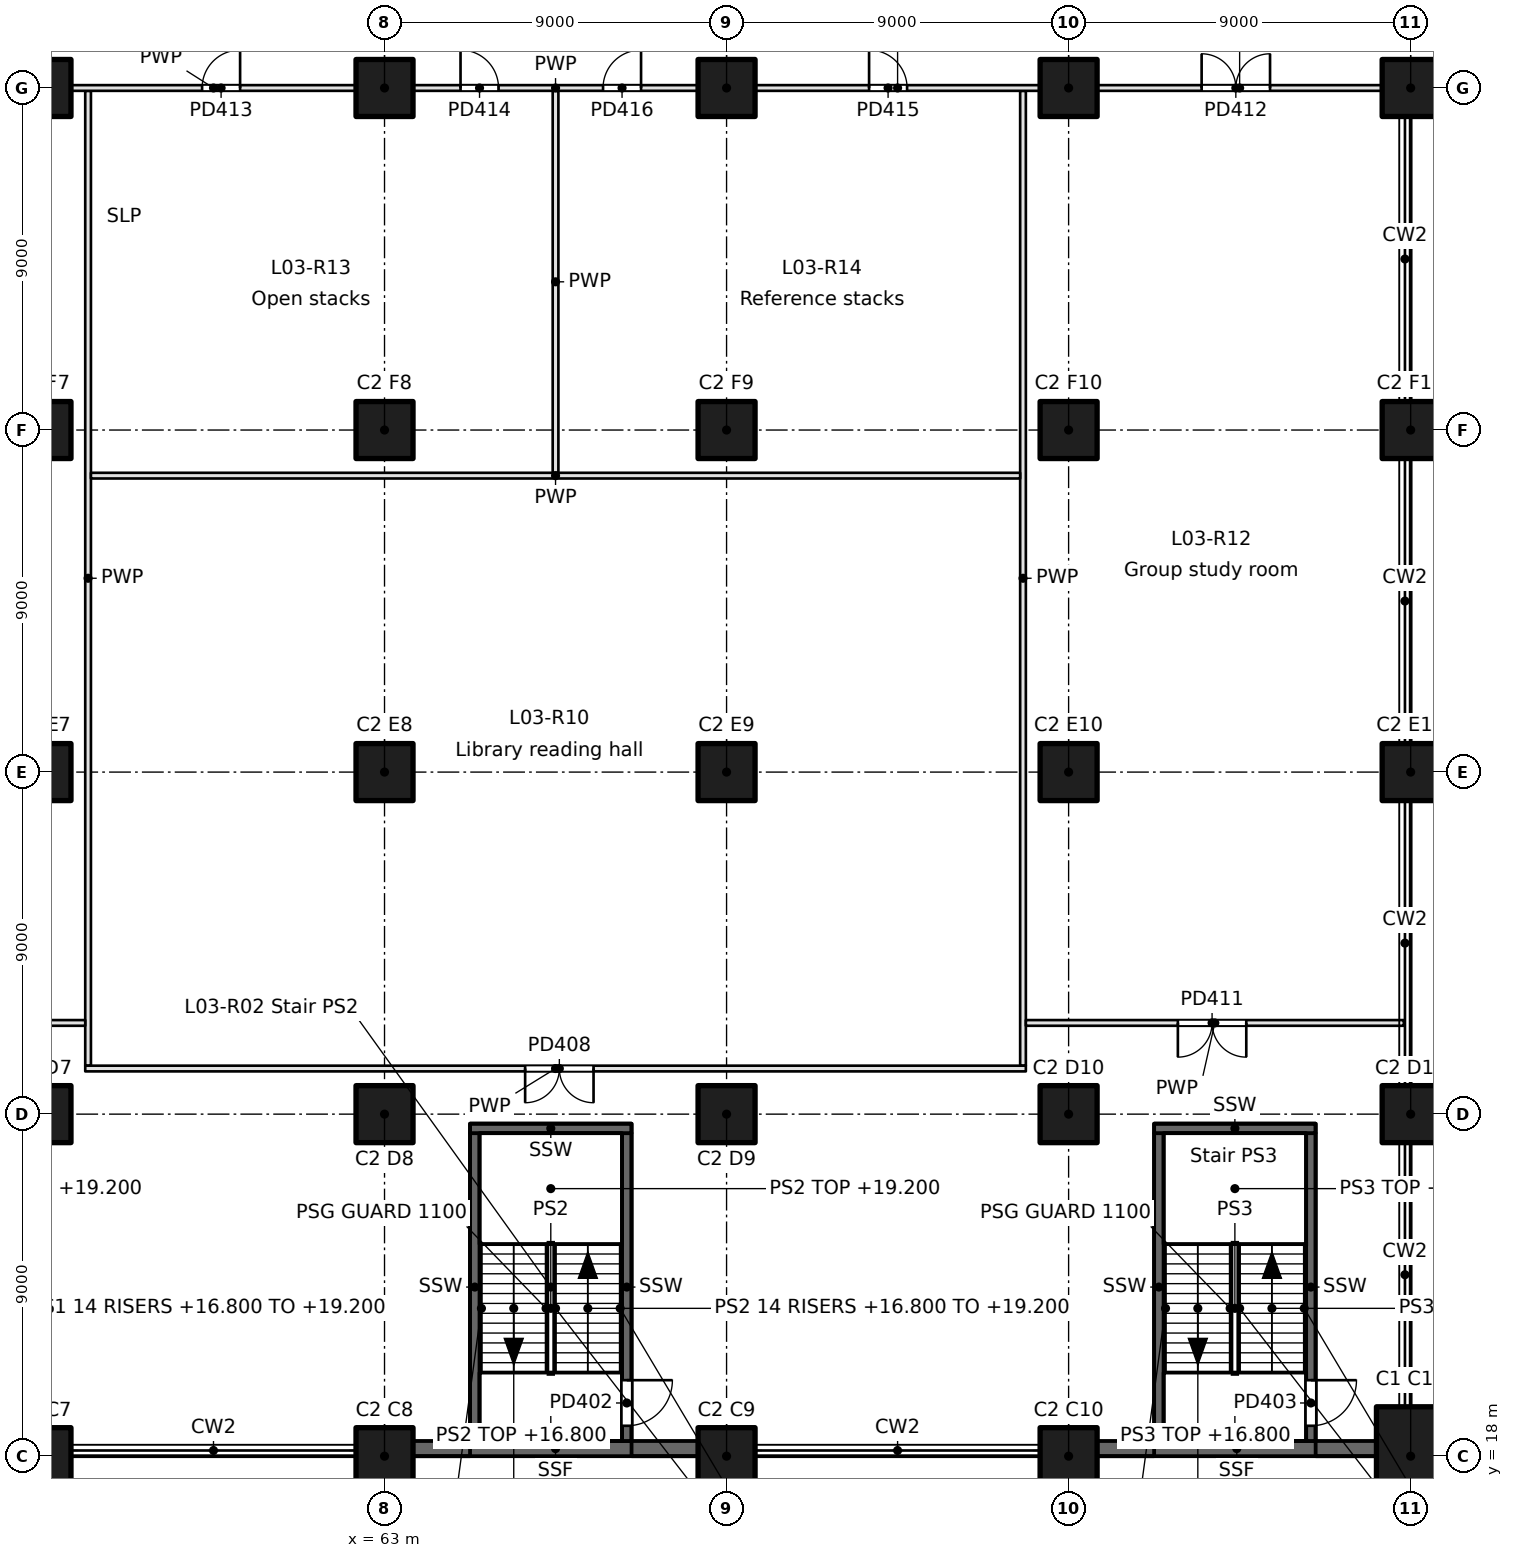
"""IFC4 building model, lengths in metres.
Left out: names, types, materials, properties, quantities, classifications, styles, units other than length and angle.
Written with IfcOpenShell. Run it as: python <this file> out.ifc"""

import sys

from ifc_helpers import new_model, si_unit, direction, frame, frame_2d, origin, origin_2d, place, context, subcontext, project, spatial, rectangle, extrude, element, fill, save


model = new_model("IFC4")
c1 = context("Model", 3, precision=1e-05, world=origin(), true_north=direction((0.0, 1.0)))
c2 = subcontext(c1, "Body", "Model", "MODEL_VIEW")
j1 = project(units=[si_unit("LENGTHUNIT", "METRE"), si_unit("PLANEANGLEUNIT", "RADIAN")], contexts=[c1])
p1 = place(None, origin())
s1 = spatial("IfcSite", under=j1, at=p1, CompositionType="ELEMENT")
p2 = place(p1, origin())
s2 = spatial("IfcBuilding", under=s1, at=p2, CompositionType="ELEMENT")
p3 = place(p2, frame((0.0, 0.0, 16.8)))
s3 = spatial("IfcBuildingStorey", under=s2, at=p3, CompositionType="ELEMENT", Elevation=16.8)
for number, where, z_axis, x_axis in (
    (1, (54.0, 54.0, 0.0), (0.0, 0.0, 1.0), (1.0, 0.0, 0.0)),
    (2, (63.0, 54.0, 0.0), (0.0, 0.0, 1.0), (1.0, 0.0, 0.0)),
    (3, (72.0, 54.0, 0.0), (0.0, 0.0, 1.0), (1.0, 0.0, 0.0)),
    (4, (81.0, 54.0, 0.0), (0.0, 0.0, 1.0), (1.0, 0.0, 0.0)),
    (5, (90.0, 54.0, 0.0), (0.0, 0.0, 1.0), (1.0, 0.0, 0.0)),
    (6, (54.0, 18.0, 0.0), (0.0, 0.0, 1.0), (1.0, 0.0, 0.0)),
    (7, (63.0, 18.0, 0.0), (0.0, 0.0, 1.0), (1.0, 0.0, 0.0)),
    (8, (72.0, 18.0, 0.0), (0.0, 0.0, 1.0), (1.0, 0.0, 0.0)),
    (9, (81.0, 18.0, 0.0), (0.0, 0.0, 1.0), (1.0, 0.0, 0.0)),
):
    element("IfcColumn", number, at=place(p3, frame(where, z_axis=z_axis, x_axis=x_axis)), inside=s3, PredefinedType="COLUMN", context=c2, shape_type="SweptSolid", body=[
        extrude(rectangle(XDim=1.5, YDim=1.5, at=origin_2d()), origin(), (0.0, 0.0, 1.0), 4.8),
    ])
p4 = place(p3, frame((90.0, 18.0, 0.0), z_axis=(0.0, 0.0, 1.0), x_axis=(0.0, 1.0, 0.0)))
e10 = element("IfcColumn", 10, at=p4, inside=s3, PredefinedType="COLUMN", context=c2, shape_type="SweptSolid", body=[
    extrude(rectangle(XDim=2.6, YDim=1.8, at=origin_2d()), origin(), (0.0, 0.0, 1.0), 4.8),
])
for number, where, z_axis, x_axis in (
    (11, (90.0, 27.0, 0.0), (0.0, 0.0, 1.0), (1.0, 0.0, 0.0)),
    (12, (90.0, 36.0, 0.0), (0.0, 0.0, 1.0), (1.0, 0.0, 0.0)),
    (13, (90.0, 45.0, 0.0), (0.0, 0.0, 1.0), (1.0, 0.0, 0.0)),
    (14, (54.0, 27.0, 0.0), (0.0, 0.0, 1.0), (1.0, 0.0, 0.0)),
):
    element("IfcColumn", number, at=place(p3, frame(where, z_axis=z_axis, x_axis=x_axis)), inside=s3, PredefinedType="COLUMN", context=c2, shape_type="SweptSolid", body=[
        extrude(rectangle(XDim=1.5, YDim=1.5, at=origin_2d()), origin(), (0.0, 0.0, 1.0), 4.8),
    ])
for number, where, z_axis, x_axis in (
    (15, (54.0, 36.0, -0.35), (0.0, 0.0, 1.0), (1.0, 0.0, 0.0)),
    (16, (54.0, 45.0, -0.35), (0.0, 0.0, 1.0), (1.0, 0.0, 0.0)),
):
    element("IfcColumn", number, at=place(p3, frame(where, z_axis=z_axis, x_axis=x_axis)), inside=s3, PredefinedType="COLUMN", context=c2, shape_type="SweptSolid", body=[
        extrude(rectangle(XDim=1.5, YDim=1.5, at=origin_2d()), origin(), (0.0, 0.0, 1.0), 5.15),
    ])
p5 = place(p3, frame((63.0, 27.0, 0.0), z_axis=(0.0, 0.0, 1.0), x_axis=(1.0, 0.0, 0.0)))
e17 = element("IfcColumn", 17, at=p5, inside=s3, PredefinedType="COLUMN", context=c2, shape_type="SweptSolid", body=[
    extrude(rectangle(XDim=1.5, YDim=1.5, at=origin_2d()), origin(), (0.0, 0.0, 1.0), 4.8),
])
for number, where, z_axis, x_axis in (
    (18, (63.0, 36.0, -0.35), (0.0, 0.0, 1.0), (1.0, 0.0, 0.0)),
    (19, (63.0, 45.0, -0.35), (0.0, 0.0, 1.0), (1.0, 0.0, 0.0)),
):
    element("IfcColumn", number, at=place(p3, frame(where, z_axis=z_axis, x_axis=x_axis)), inside=s3, PredefinedType="COLUMN", context=c2, shape_type="SweptSolid", body=[
        extrude(rectangle(XDim=1.5, YDim=1.5, at=origin_2d()), origin(), (0.0, 0.0, 1.0), 5.15),
    ])
p6 = place(p3, frame((72.0, 27.0, 0.0), z_axis=(0.0, 0.0, 1.0), x_axis=(1.0, 0.0, 0.0)))
e20 = element("IfcColumn", 20, at=p6, inside=s3, PredefinedType="COLUMN", context=c2, shape_type="SweptSolid", body=[
    extrude(rectangle(XDim=1.5, YDim=1.5, at=origin_2d()), origin(), (0.0, 0.0, 1.0), 4.8),
])
for number, where, z_axis, x_axis in (
    (21, (72.0, 36.0, -0.35), (0.0, 0.0, 1.0), (1.0, 0.0, 0.0)),
    (22, (72.0, 45.0, -0.35), (0.0, 0.0, 1.0), (1.0, 0.0, 0.0)),
):
    element("IfcColumn", number, at=place(p3, frame(where, z_axis=z_axis, x_axis=x_axis)), inside=s3, PredefinedType="COLUMN", context=c2, shape_type="SweptSolid", body=[
        extrude(rectangle(XDim=1.5, YDim=1.5, at=origin_2d()), origin(), (0.0, 0.0, 1.0), 5.15),
    ])
p7 = place(p3, frame((81.0, 27.0, 0.0), z_axis=(0.0, 0.0, 1.0), x_axis=(1.0, 0.0, 0.0)))
e23 = element("IfcColumn", 23, at=p7, inside=s3, PredefinedType="COLUMN", context=c2, shape_type="SweptSolid", body=[
    extrude(rectangle(XDim=1.5, YDim=1.5, at=origin_2d()), origin(), (0.0, 0.0, 1.0), 4.8),
])
for number, where, z_axis, x_axis in (
    (24, (81.0, 36.0, -0.35), (0.0, 0.0, 1.0), (1.0, 0.0, 0.0)),
    (25, (81.0, 45.0, -0.35), (0.0, 0.0, 1.0), (1.0, 0.0, 0.0)),
):
    element("IfcColumn", number, at=place(p3, frame(where, z_axis=z_axis, x_axis=x_axis)), inside=s3, PredefinedType="COLUMN", context=c2, shape_type="SweptSolid", body=[
        extrude(rectangle(XDim=1.5, YDim=1.5, at=origin_2d()), origin(), (0.0, 0.0, 1.0), 5.15),
    ])
p8 = place(p3, frame((65.375, 18.4, 0.0), z_axis=(0.0, 0.0, 1.0), x_axis=(0.0, 1.0, 0.0)))
e26 = element("IfcWall", 26, at=p8, inside=s3, PredefinedType="SOLIDWALL", context=c2, shape_type="SweptSolid", body=[
    extrude(rectangle(XDim=8.1, YDim=0.25, at=frame_2d((4.05, 0.0))), origin(), (0.0, 0.0, 1.0), 4.8),
])
p9 = place(p3, frame((69.375, 26.5, 0.0), z_axis=(0.0, 0.0, 1.0), x_axis=(0.0, -1.0, 0.0)))
e27 = element("IfcWall", 27, at=p9, inside=s3, PredefinedType="SOLIDWALL", context=c2, shape_type="SweptSolid", body=[
    extrude(rectangle(XDim=8.1, YDim=0.25, at=frame_2d((4.05, 0.0))), origin(), (0.0, 0.0, 1.0), 4.8),
])
p10 = place(p9, frame((6.5, 0.0, 0.0)))
e28 = element("IfcOpeningElement", 28, at=p10, cuts=e27, PredefinedType="OPENING", context=c2, shape_type="SweptSolid", body=[
    extrude(rectangle(XDim=1.2, YDim=2.1, at=frame_2d((0.6, 1.05))), frame((0.0, 0.125, 0.0), z_axis=(0.0, -1.0, 0.0), x_axis=(1.0, 0.0, 0.0)), (0.0, 0.0, 1.0), 0.25),
])
p11 = place(p3, frame((65.25, 26.625, 0.0), z_axis=(0.0, 0.0, 1.0), x_axis=(1.0, 0.0, 0.0)))
e29 = element("IfcWall", 29, at=p11, inside=s3, PredefinedType="SOLIDWALL", context=c2, shape_type="SweptSolid", body=[
    extrude(rectangle(XDim=4.25, YDim=0.25, at=frame_2d((2.125, 0.0))), origin(), (0.0, 0.0, 1.0), 4.8),
])
p12 = place(p3, frame((83.375, 18.4, 0.0), z_axis=(0.0, 0.0, 1.0), x_axis=(0.0, 1.0, 0.0)))
e30 = element("IfcWall", 30, at=p12, inside=s3, PredefinedType="SOLIDWALL", context=c2, shape_type="SweptSolid", body=[
    extrude(rectangle(XDim=8.1, YDim=0.25, at=frame_2d((4.05, 0.0))), origin(), (0.0, 0.0, 1.0), 4.8),
])
p13 = place(p3, frame((87.375, 26.5, 0.0), z_axis=(0.0, 0.0, 1.0), x_axis=(0.0, -1.0, 0.0)))
e31 = element("IfcWall", 31, at=p13, inside=s3, PredefinedType="SOLIDWALL", context=c2, shape_type="SweptSolid", body=[
    extrude(rectangle(XDim=8.1, YDim=0.25, at=frame_2d((4.05, 0.0))), origin(), (0.0, 0.0, 1.0), 4.8),
])
p14 = place(p13, frame((6.5, 0.0, 0.0)))
e32 = element("IfcOpeningElement", 32, at=p14, cuts=e31, PredefinedType="OPENING", context=c2, shape_type="SweptSolid", body=[
    extrude(rectangle(XDim=1.2, YDim=2.1, at=frame_2d((0.6, 1.05))), frame((0.0, 0.125, 0.0), z_axis=(0.0, -1.0, 0.0), x_axis=(1.0, 0.0, 0.0)), (0.0, 0.0, 1.0), 0.25),
])
p15 = place(p3, frame((83.25, 26.625, 0.0), z_axis=(0.0, 0.0, 1.0), x_axis=(1.0, 0.0, 0.0)))
e33 = element("IfcWall", 33, at=p15, inside=s3, PredefinedType="SOLIDWALL", context=c2, shape_type="SweptSolid", body=[
    extrude(rectangle(XDim=4.25, YDim=0.25, at=frame_2d((2.125, 0.0))), origin(), (0.0, 0.0, 1.0), 4.8),
])
p16 = place(p3, frame((71.25, 18.2, 0.0), z_axis=(0.0, 0.0, 1.0), x_axis=(-1.0, 0.0, 0.0)))
e34 = element("IfcWall", 34, at=p16, inside=s3, PredefinedType="SOLIDWALL", context=c2, shape_type="SweptSolid", body=[
    extrude(rectangle(XDim=7.5, YDim=0.4, at=frame_2d((3.75, 0.0))), origin(), (0.0, 0.0, 1.0), 4.45),
])
p17 = place(p3, frame((89.1, 18.2, 0.0), z_axis=(0.0, 0.0, 1.0), x_axis=(-1.0, 0.0, 0.0)))
e35 = element("IfcWall", 35, at=p17, inside=s3, PredefinedType="SOLIDWALL", context=c2, shape_type="SweptSolid", body=[
    extrude(rectangle(XDim=7.35, YDim=0.4, at=frame_2d((3.675, 0.0))), origin(), (0.0, 0.0, 1.0), 4.45),
])
for number, where, z_axis, x_axis in (
    (36, (55.2, 28.275, 0.0), (0.0, 0.0, 1.0), (0.0, 1.0, 0.0)),
    (37, (79.8, 28.275, 0.0), (0.0, 0.0, 1.0), (0.0, 1.0, 0.0)),
):
    element("IfcWall", number, at=place(p3, frame(where, z_axis=z_axis, x_axis=x_axis)), inside=s3, PredefinedType="PARTITIONING", context=c2, shape_type="SweptSolid", body=[
        extrude(rectangle(XDim=25.65, YDim=0.15, at=frame_2d((12.825, 0.0))), origin(), (0.0, 0.0, 1.0), 4.45),
    ])
p18 = place(p3, frame((55.275, 43.8, 0.0), z_axis=(0.0, 0.0, 1.0), x_axis=(1.0, 0.0, 0.0)))
e38 = element("IfcWall", 38, at=p18, inside=s3, PredefinedType="PARTITIONING", context=c2, shape_type="SweptSolid", body=[
    extrude(rectangle(XDim=24.45, YDim=0.15, at=frame_2d((12.225, 0.0))), origin(), (0.0, 0.0, 1.0), 4.45),
])
p19 = place(p3, frame((79.875, 28.2, 0.0), z_axis=(0.0, 0.0, 1.0), x_axis=(-1.0, 0.0, 0.0)))
e39 = element("IfcWall", 39, at=p19, inside=s3, PredefinedType="PARTITIONING", context=c2, shape_type="SweptSolid", body=[
    extrude(rectangle(XDim=24.75, YDim=0.15, at=frame_2d((12.375, 0.0))), origin(), (0.0, 0.0, 1.0), 4.45),
])
p20 = place(p19, frame((11.375, 0.0, 0.0)))
e40 = element("IfcOpeningElement", 40, at=p20, cuts=e39, PredefinedType="OPENING", context=c2, shape_type="SweptSolid", body=[
    extrude(rectangle(XDim=1.8, YDim=2.1, at=frame_2d((0.9, 1.05))), frame((0.0, 0.075, 0.0), z_axis=(0.0, -1.0, 0.0), x_axis=(1.0, 0.0, 0.0)), (0.0, 0.0, 1.0), 0.15),
])
p21 = place(p3, frame((55.125, 29.4, 0.0), z_axis=(0.0, 0.0, 1.0), x_axis=(-1.0, 0.0, 0.0)))
e41 = element("IfcWall", 41, at=p21, inside=s3, PredefinedType="PARTITIONING", context=c2, shape_type="SweptSolid", body=[
    extrude(rectangle(XDim=10.2, YDim=0.15, at=frame_2d((5.1, 0.0))), origin(), (0.0, 0.0, 1.0), 4.45),
])
p22 = place(p21, frame((4.075, 0.0, 0.0)))
e42 = element("IfcOpeningElement", 42, at=p22, cuts=e41, PredefinedType="OPENING", context=c2, shape_type="SweptSolid", body=[
    extrude(rectangle(XDim=1.8, YDim=2.1, at=frame_2d((0.9, 1.05))), frame((0.0, 0.075, 0.0), z_axis=(0.0, -1.0, 0.0), x_axis=(1.0, 0.0, 0.0)), (0.0, 0.0, 1.0), 0.15),
])
p23 = place(p3, frame((89.82, 29.4, 0.0), z_axis=(0.0, 0.0, 1.0), x_axis=(-1.0, 0.0, 0.0)))
e43 = element("IfcWall", 43, at=p23, inside=s3, PredefinedType="PARTITIONING", context=c2, shape_type="SweptSolid", body=[
    extrude(rectangle(XDim=9.945, YDim=0.15, at=frame_2d((4.973, 0.0))), origin(), (0.0, 0.0, 1.0), 4.45),
])
p24 = place(p23, frame((4.145, 0.0, 0.0)))
e44 = element("IfcOpeningElement", 44, at=p24, cuts=e43, PredefinedType="OPENING", context=c2, shape_type="SweptSolid", body=[
    extrude(rectangle(XDim=1.8, YDim=2.1, at=frame_2d((0.9, 1.05))), frame((0.0, 0.075, 0.0), z_axis=(0.0, -1.0, 0.0), x_axis=(1.0, 0.0, 0.0)), (0.0, 0.0, 1.0), 0.15),
])
p25 = place(p3, frame((54.75, 54.0, 0.0), z_axis=(0.0, 0.0, 1.0), x_axis=(1.0, 0.0, 0.0)))
e45 = element("IfcWall", 45, at=p25, inside=s3, PredefinedType="PARTITIONING", context=c2, shape_type="SweptSolid", body=[
    extrude(rectangle(XDim=7.5, YDim=0.15, at=frame_2d((3.75, 0.0))), origin(), (0.0, 0.0, 1.0), 4.45),
])
p26 = place(p25, frame((3.45, 0.0, 0.0)))
e46 = element("IfcOpeningElement", 46, at=p26, cuts=e45, PredefinedType="OPENING", context=c2, shape_type="SweptSolid", body=[
    extrude(rectangle(XDim=1.0, YDim=2.1, at=frame_2d((0.5, 1.05))), frame((0.0, 0.075, 0.0), z_axis=(0.0, -1.0, 0.0), x_axis=(1.0, 0.0, 0.0)), (0.0, 0.0, 1.0), 0.15),
])
p27 = place(p3, frame((63.75, 54.0, 0.0), z_axis=(0.0, 0.0, 1.0), x_axis=(1.0, 0.0, 0.0)))
e47 = element("IfcWall", 47, at=p27, inside=s3, PredefinedType="PARTITIONING", context=c2, shape_type="SweptSolid", body=[
    extrude(rectangle(XDim=7.5, YDim=0.15, at=frame_2d((3.75, 0.0))), origin(), (0.0, 0.0, 1.0), 4.45),
])
p28 = place(p27, frame((1.25, 0.0, 0.0)))
e48 = element("IfcOpeningElement", 48, at=p28, cuts=e47, PredefinedType="OPENING", context=c2, shape_type="SweptSolid", body=[
    extrude(rectangle(XDim=1.0, YDim=2.1, at=frame_2d((0.5, 1.05))), frame((0.0, 0.075, 0.0), z_axis=(0.0, -1.0, 0.0), x_axis=(1.0, 0.0, 0.0)), (0.0, 0.0, 1.0), 0.15),
])
p29 = place(p27, frame((5.0, 0.0, 0.0)))
e49 = element("IfcOpeningElement", 49, at=p29, cuts=e47, PredefinedType="OPENING", context=c2, shape_type="SweptSolid", body=[
    extrude(rectangle(XDim=1.0, YDim=2.1, at=frame_2d((0.5, 1.05))), frame((0.0, 0.075, 0.0), z_axis=(0.0, -1.0, 0.0), x_axis=(1.0, 0.0, 0.0)), (0.0, 0.0, 1.0), 0.15),
])
p30 = place(p3, frame((72.75, 54.0, 0.0), z_axis=(0.0, 0.0, 1.0), x_axis=(1.0, 0.0, 0.0)))
e50 = element("IfcWall", 50, at=p30, inside=s3, PredefinedType="PARTITIONING", context=c2, shape_type="SweptSolid", body=[
    extrude(rectangle(XDim=7.5, YDim=0.15, at=frame_2d((3.75, 0.0))), origin(), (0.0, 0.0, 1.0), 4.45),
])
p31 = place(p30, frame((3.0, 0.0, 0.0)))
e51 = element("IfcOpeningElement", 51, at=p31, cuts=e50, PredefinedType="OPENING", context=c2, shape_type="SweptSolid", body=[
    extrude(rectangle(XDim=1.0, YDim=2.1, at=frame_2d((0.5, 1.05))), frame((0.0, 0.075, 0.0), z_axis=(0.0, -1.0, 0.0), x_axis=(1.0, 0.0, 0.0)), (0.0, 0.0, 1.0), 0.15),
])
p32 = place(p3, frame((81.75, 54.0, 0.0), z_axis=(0.0, 0.0, 1.0), x_axis=(1.0, 0.0, 0.0)))
e52 = element("IfcWall", 52, at=p32, inside=s3, PredefinedType="PARTITIONING", context=c2, shape_type="SweptSolid", body=[
    extrude(rectangle(XDim=7.5, YDim=0.15, at=frame_2d((3.75, 0.0))), origin(), (0.0, 0.0, 1.0), 4.45),
])
p33 = place(p32, frame((2.75, 0.0, 0.0)))
e53 = element("IfcOpeningElement", 53, at=p33, cuts=e52, PredefinedType="OPENING", context=c2, shape_type="SweptSolid", body=[
    extrude(rectangle(XDim=1.8, YDim=2.1, at=frame_2d((0.9, 1.05))), frame((0.0, 0.075, 0.0), z_axis=(0.0, -1.0, 0.0), x_axis=(1.0, 0.0, 0.0)), (0.0, 0.0, 1.0), 0.15),
])
p34 = place(p3, frame((67.5, 43.875, 0.0), z_axis=(0.0, 0.0, 1.0), x_axis=(0.0, 1.0, 0.0)))
e54 = element("IfcWall", 54, at=p34, inside=s3, PredefinedType="PARTITIONING", context=c2, shape_type="SweptSolid", body=[
    extrude(rectangle(XDim=10.05, YDim=0.15, at=frame_2d((5.025, 0.0))), origin(), (0.0, 0.0, 1.0), 4.45),
])
p35 = place(p10, origin())
e55 = element("IfcDoor", 55, at=p35, inside=s3, OperationType="SINGLE_SWING_LEFT", PredefinedType="DOOR", context=c2, shape_type="SweptSolid", body=[
    extrude(rectangle(XDim=1.2, YDim=2.1, at=frame_2d((0.6, 1.05))), frame((0.0, 0.025, 0.0), z_axis=(0.0, -1.0, 0.0), x_axis=(1.0, 0.0, 0.0)), (0.0, 0.0, 1.0), 0.05),
])
fill(e28, e55)
p36 = place(p14, origin())
e56 = element("IfcDoor", 56, at=p36, inside=s3, OperationType="SINGLE_SWING_LEFT", PredefinedType="DOOR", context=c2, shape_type="SweptSolid", body=[
    extrude(rectangle(XDim=1.2, YDim=2.1, at=frame_2d((0.6, 1.05))), frame((0.0, 0.025, 0.0), z_axis=(0.0, -1.0, 0.0), x_axis=(1.0, 0.0, 0.0)), (0.0, 0.0, 1.0), 0.05),
])
fill(e32, e56)
p37 = place(p20, origin())
e57 = element("IfcDoor", 57, at=p37, inside=s3, OperationType="DOUBLE_DOOR_SINGLE_SWING", PredefinedType="DOOR", context=c2, shape_type="SweptSolid", body=[
    extrude(rectangle(XDim=1.8, YDim=2.1, at=frame_2d((0.9, 1.05))), frame((0.0, 0.025, 0.0), z_axis=(0.0, -1.0, 0.0), x_axis=(1.0, 0.0, 0.0)), (0.0, 0.0, 1.0), 0.05),
])
fill(e40, e57)
p38 = place(p24, origin())
e58 = element("IfcDoor", 58, at=p38, inside=s3, OperationType="DOUBLE_DOOR_SINGLE_SWING", PredefinedType="DOOR", context=c2, shape_type="SweptSolid", body=[
    extrude(rectangle(XDim=1.8, YDim=2.1, at=frame_2d((0.9, 1.05))), frame((0.0, 0.025, 0.0), z_axis=(0.0, -1.0, 0.0), x_axis=(1.0, 0.0, 0.0)), (0.0, 0.0, 1.0), 0.05),
])
fill(e44, e58)
p39 = place(p33, origin())
e59 = element("IfcDoor", 59, at=p39, inside=s3, OperationType="DOUBLE_DOOR_SINGLE_SWING", PredefinedType="DOOR", context=c2, shape_type="SweptSolid", body=[
    extrude(rectangle(XDim=1.8, YDim=2.1, at=frame_2d((0.9, 1.05))), frame((0.0, 0.025, 0.0), z_axis=(0.0, -1.0, 0.0), x_axis=(1.0, 0.0, 0.0)), (0.0, 0.0, 1.0), 0.05),
])
fill(e53, e59)
p40 = place(p26, origin())
e60 = element("IfcDoor", 60, at=p40, inside=s3, OperationType="SINGLE_SWING_RIGHT", PredefinedType="DOOR", context=c2, shape_type="SweptSolid", body=[
    extrude(rectangle(XDim=1.0, YDim=2.1, at=frame_2d((0.5, 1.05))), frame((0.0, 0.025, 0.0), z_axis=(0.0, -1.0, 0.0), x_axis=(1.0, 0.0, 0.0)), (0.0, 0.0, 1.0), 0.05),
])
fill(e46, e60)
p41 = place(p28, origin())
e61 = element("IfcDoor", 61, at=p41, inside=s3, OperationType="SINGLE_SWING_LEFT", PredefinedType="DOOR", context=c2, shape_type="SweptSolid", body=[
    extrude(rectangle(XDim=1.0, YDim=2.1, at=frame_2d((0.5, 1.05))), frame((0.0, 0.025, 0.0), z_axis=(0.0, -1.0, 0.0), x_axis=(1.0, 0.0, 0.0)), (0.0, 0.0, 1.0), 0.05),
])
fill(e48, e61)
p42 = place(p31, origin())
e62 = element("IfcDoor", 62, at=p42, inside=s3, OperationType="SINGLE_SWING_LEFT", PredefinedType="DOOR", context=c2, shape_type="SweptSolid", body=[
    extrude(rectangle(XDim=1.0, YDim=2.1, at=frame_2d((0.5, 1.05))), frame((0.0, 0.025, 0.0), z_axis=(0.0, -1.0, 0.0), x_axis=(1.0, 0.0, 0.0)), (0.0, 0.0, 1.0), 0.05),
])
fill(e51, e62)
p43 = place(p29, origin())
e63 = element("IfcDoor", 63, at=p43, inside=s3, OperationType="SINGLE_SWING_RIGHT", PredefinedType="DOOR", context=c2, shape_type="SweptSolid", body=[
    extrude(rectangle(XDim=1.0, YDim=2.1, at=frame_2d((0.5, 1.05))), frame((0.0, 0.025, 0.0), z_axis=(0.0, -1.0, 0.0), x_axis=(1.0, 0.0, 0.0)), (0.0, 0.0, 1.0), 0.05),
])
fill(e49, e63)
save(model, sys.argv[1])
